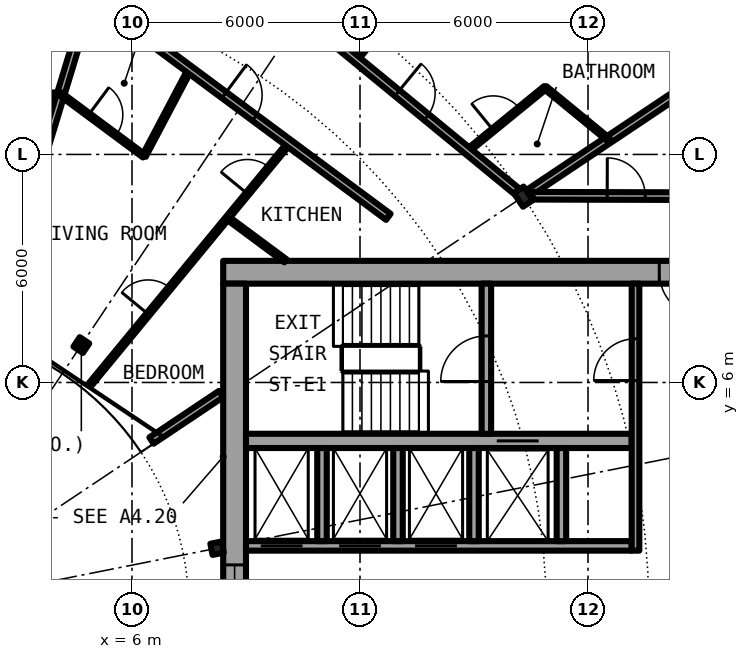
"""IFC4 building model, lengths in metres.
Left out: names, types, materials, properties, quantities, classifications, styles, units other than length and angle.
Written with IfcOpenShell. Run it as: python <this file> out.ifc"""

import sys

from ifc_helpers import new_model, si_unit, direction, frame, frame_2d, origin, origin_2d, place, context, subcontext, project, spatial, rectangle, i_section, extrude, element, fill, save


model = new_model("IFC4")
c1 = context("Model", 3, precision=1e-05, world=origin(), true_north=direction((0.0, 1.0)))
c2 = subcontext(c1, "Body", "Model", "MODEL_VIEW")
j1 = project(units=[si_unit("LENGTHUNIT", "METRE"), si_unit("PLANEANGLEUNIT", "RADIAN")], contexts=[c1])
p1 = place(None, origin())
s1 = spatial("IfcSite", under=j1, at=p1, CompositionType="ELEMENT")
p2 = place(p1, origin())
s2 = spatial("IfcBuilding", under=s1, at=p2, CompositionType="ELEMENT")
p3 = place(p2, frame((0.0, 0.0, 111.65)))
s3 = spatial("IfcBuildingStorey", under=s2, at=p3, CompositionType="ELEMENT", Elevation=111.65)
p4 = place(p3, frame((16.297, 10.889, 0.0), z_axis=(0.0, 0.0, 1.0), x_axis=(0.831469612303, 0.55557023302, 0.0)))
e1 = element("IfcColumn", 1, at=p4, inside=s3, PredefinedType="COLUMN", context=c2, shape_type="SweptSolid", body=[
    extrude(i_section(OverallWidth=0.307, OverallDepth=0.432, WebThickness=0.021, FlangeThickness=0.04, FilletRadius=0.027, at=origin_2d()), origin(), (0.0, 0.0, 1.0), 3.05),
])
for number, where, z_axis, x_axis in (
    (2, (8.239, 1.639, 0.0), (0.0, 0.0, 1.0), (0.981, 0.195, 0.0)),
    (3, (4.667, 6.984, 0.0), (0.0, 0.0, 1.0), (0.556, 0.831, 0.0)),
):
    element("IfcColumn", number, at=place(p3, frame(where, z_axis=z_axis, x_axis=x_axis)), inside=s3, PredefinedType="COLUMN", context=c2, shape_type="SweptSolid", body=[
        extrude(i_section(OverallWidth=0.3, OverallDepth=0.3, WebThickness=0.011, FlangeThickness=0.019, FilletRadius=0.027, at=origin_2d()), origin(), (0.0, 0.0, 1.0), 3.05),
    ])
p5 = place(p3, frame((22.2, 8.9, 0.0), z_axis=(0.0, 0.0, 1.0), x_axis=(-1.0, 0.0, 0.0)))
e4 = element("IfcWall", 4, at=p5, inside=s3, PredefinedType="SHEAR", context=c2, shape_type="SweptSolid", body=[
    extrude(rectangle(XDim=13.8, YDim=0.6, at=frame_2d((6.9, 0.0))), origin(), (0.0, 0.0, 1.0), 3.05),
])
p6 = place(p5, frame((1.125, 0.0, 0.0)))
e5 = element("IfcOpeningElement", 5, at=p6, cuts=e4, PredefinedType="OPENING", context=c2, shape_type="SweptSolid", body=[
    extrude(rectangle(XDim=1.2, YDim=2.3, at=frame_2d((0.6, 1.15))), frame((0.0, 0.31, 0.0), z_axis=(0.0, -1.0, 0.0), x_axis=(1.0, 0.0, 0.0)), (0.0, 0.0, 1.0), 0.62),
])
p7 = place(p3, frame((8.7, -8.6, 0.0), z_axis=(0.0, 0.0, 1.0), x_axis=(0.0, 1.0, 0.0)))
e6 = element("IfcWall", 6, at=p7, inside=s3, PredefinedType="SHEAR", context=c2, shape_type="SweptSolid", body=[
    extrude(rectangle(XDim=17.2, YDim=0.6, at=frame_2d((8.6, 0.0))), origin(), (0.0, 0.0, 1.0), 3.05),
])
p8 = place(p7, frame((7.4, 0.0, 0.1)))
e7 = element("IfcOpeningElement", 7, at=p8, cuts=e6, PredefinedType="OPENING", context=c2, shape_type="SweptSolid", body=[
    extrude(rectangle(XDim=2.4, YDim=2.2, at=frame_2d((1.2, 1.1))), frame((0.0, 0.31, 0.0), z_axis=(0.0, -1.0, 0.0), x_axis=(1.0, 0.0, 0.0)), (0.0, 0.0, 1.0), 0.62),
])
p9 = place(p3, frame((9.0, 1.7, 0.0), z_axis=(0.0, 0.0, 1.0), x_axis=(1.0, 0.0, 0.0)))
e8 = element("IfcWall", 8, at=p9, inside=s3, PredefinedType="SHEAR", context=c2, shape_type="SweptSolid", body=[
    extrude(rectangle(XDim=10.15, YDim=0.25, at=frame_2d((5.075, 0.0))), origin(), (0.0, 0.0, 1.0), 3.05),
])
p10 = place(p9, frame((0.387, 0.0, 0.0)))
e9 = element("IfcOpeningElement", 9, at=p10, cuts=e8, PredefinedType="OPENING", context=c2, shape_type="SweptSolid", body=[
    extrude(rectangle(XDim=1.1, YDim=2.3, at=frame_2d((0.55, 1.15))), frame((0.0, 0.135, 0.0), z_axis=(0.0, -1.0, 0.0), x_axis=(1.0, 0.0, 0.0)), (0.0, 0.0, 1.0), 0.27),
])
p11 = place(p9, frame((2.45, 0.0, 0.0)))
e10 = element("IfcOpeningElement", 10, at=p11, cuts=e8, PredefinedType="OPENING", context=c2, shape_type="SweptSolid", body=[
    extrude(rectangle(XDim=1.1, YDim=2.3, at=frame_2d((0.55, 1.15))), frame((0.0, 0.135, 0.0), z_axis=(0.0, -1.0, 0.0), x_axis=(1.0, 0.0, 0.0)), (0.0, 0.0, 1.0), 0.27),
])
p12 = place(p9, frame((4.45, 0.0, 0.0)))
e11 = element("IfcOpeningElement", 11, at=p12, cuts=e8, PredefinedType="OPENING", context=c2, shape_type="SweptSolid", body=[
    extrude(rectangle(XDim=1.1, YDim=2.3, at=frame_2d((0.55, 1.15))), frame((0.0, 0.135, 0.0), z_axis=(0.0, -1.0, 0.0), x_axis=(1.0, 0.0, 0.0)), (0.0, 0.0, 1.0), 0.27),
])
p13 = place(p3, frame((9.0, 4.462, 0.0), z_axis=(0.0, 0.0, 1.0), x_axis=(1.0, 0.0, 0.0)))
e12 = element("IfcWall", 12, at=p13, inside=s3, PredefinedType="SHEAR", context=c2, shape_type="SweptSolid", body=[
    extrude(rectangle(XDim=10.15, YDim=0.375, at=frame_2d((5.075, 0.0))), origin(), (0.0, 0.0, 1.0), 3.05),
])
p14 = place(p13, frame((6.6, 0.0, 0.0)))
e13 = element("IfcOpeningElement", 13, at=p14, cuts=e12, PredefinedType="OPENING", context=c2, shape_type="SweptSolid", body=[
    extrude(rectangle(XDim=1.1, YDim=2.3, at=frame_2d((0.55, 1.15))), frame((0.0, 0.198, 0.0), z_axis=(0.0, -1.0, 0.0), x_axis=(1.0, 0.0, 0.0)), (0.0, 0.0, 1.0), 0.395),
])
p15 = place(p3, frame((15.325, 4.65, 0.0), z_axis=(0.0, 0.0, 1.0), x_axis=(0.0, 1.0, 0.0)))
e14 = element("IfcWall", 14, at=p15, inside=s3, PredefinedType="SHEAR", context=c2, shape_type="SweptSolid", body=[
    extrude(rectangle(XDim=3.95, YDim=0.25, at=frame_2d((1.975, 0.0))), origin(), (0.0, 0.0, 1.0), 3.05),
])
p16 = place(p15, frame((1.375, 0.0, 0.0)))
e15 = element("IfcOpeningElement", 15, at=p16, cuts=e14, PredefinedType="OPENING", context=c2, shape_type="SweptSolid", body=[
    extrude(rectangle(XDim=1.2, YDim=2.3, at=frame_2d((0.6, 1.15))), frame((0.0, 0.135, 0.0), z_axis=(0.0, -1.0, 0.0), x_axis=(1.0, 0.0, 0.0)), (0.0, 0.0, 1.0), 0.27),
])
for number, where, z_axis, x_axis in (
    (16, (15.0, 1.825, 0.0), (0.0, 0.0, 1.0), (0.0, 1.0, 0.0)),
    (17, (17.3, 1.825, 0.0), (0.0, 0.0, 1.0), (0.0, 1.0, 0.0)),
):
    element("IfcWall", number, at=place(p3, frame(where, z_axis=z_axis, x_axis=x_axis)), inside=s3, PredefinedType="SOLIDWALL", context=c2, shape_type="SweptSolid", body=[
        extrude(rectangle(XDim=2.45, YDim=0.25, at=frame_2d((1.225, 0.0))), origin(), (0.0, 0.0, 1.0), 2.7),
    ])
p17 = place(p3, frame((19.25, 1.575, 0.0), z_axis=(0.0, 0.0, 1.0), x_axis=(0.0, 1.0, 0.0)))
e18 = element("IfcWall", 18, at=p17, inside=s3, PredefinedType="SOLIDWALL", context=c2, shape_type="SweptSolid", body=[
    extrude(rectangle(XDim=7.025, YDim=0.2, at=frame_2d((3.513, 0.0))), origin(), (0.0, 0.0, 1.0), 2.7),
])
p18 = place(p17, frame((4.475, 0.0, 0.0)))
e19 = element("IfcOpeningElement", 19, at=p18, cuts=e18, PredefinedType="OPENING", context=c2, shape_type="SweptSolid", body=[
    extrude(rectangle(XDim=1.1, YDim=2.3, at=frame_2d((0.55, 1.15))), frame((0.0, 0.11, 0.0), z_axis=(0.0, -1.0, 0.0), x_axis=(1.0, 0.0, 0.0)), (0.0, 0.0, 1.0), 0.22),
])
for number, where, z_axis, x_axis in (
    (20, (11.0, 1.825, 0.0), (0.0, 0.0, 1.0), (0.0, 1.0, 0.0)),
    (21, (13.0, 1.825, 0.0), (0.0, 0.0, 1.0), (0.0, 1.0, 0.0)),
):
    element("IfcWall", number, at=place(p3, frame(where, z_axis=z_axis, x_axis=x_axis)), inside=s3, PredefinedType="SOLIDWALL", context=c2, shape_type="SweptSolid", body=[
        extrude(rectangle(XDim=2.45, YDim=0.25, at=frame_2d((1.225, 0.0))), origin(), (0.0, 0.0, 1.0), 2.7),
    ])
p19 = place(p3, frame((2.243, 7.387, 0.0), z_axis=(0.0, 0.0, 1.0), x_axis=(0.290622919271, 0.956837665853, 0.0)))
e22 = element("IfcWall", 22, at=p19, inside=s3, PredefinedType="PARTITIONING", context=c2, shape_type="SweptSolid", body=[
    extrude(rectangle(XDim=9.18, YDim=0.2, at=frame_2d((4.59, 0.0))), origin(), (0.0, 0.0, 1.0), 2.7),
])
p20 = place(p3, frame((4.909, 5.958, 0.0), z_axis=(0.0, 0.0, 1.0), x_axis=(0.635976043025, 0.771708800454, 0.0)))
e23 = element("IfcWall", 23, at=p20, inside=s3, PredefinedType="PARTITIONING", context=c2, shape_type="SweptSolid", body=[
    extrude(rectangle(XDim=8.213, YDim=0.1, at=frame_2d((4.106, 0.0))), origin(), (0.0, 0.0, 1.0), 2.7),
])
p21 = place(p20, frame((6.49, 0.0, 0.0)))
e24 = element("IfcOpeningElement", 24, at=p21, cuts=e23, PredefinedType="OPENING", context=c2, shape_type="SweptSolid", body=[
    extrude(rectangle(XDim=0.9, YDim=2.3, at=frame_2d((0.45, 1.15))), frame((0.0, 0.06, 0.0), z_axis=(0.0, -1.0, 0.0), x_axis=(1.0, 0.0, 0.0)), (0.0, 0.0, 1.0), 0.12),
])
p22 = place(p20, frame((2.384, 0.0, 0.0)))
e25 = element("IfcOpeningElement", 25, at=p22, cuts=e23, PredefinedType="OPENING", context=c2, shape_type="SweptSolid", body=[
    extrude(rectangle(XDim=0.9, YDim=2.3, at=frame_2d((0.45, 1.15))), frame((0.0, 0.06, 0.0), z_axis=(0.0, -1.0, 0.0), x_axis=(1.0, 0.0, 0.0)), (0.0, 0.0, 1.0), 0.12),
])
p23 = place(p3, frame((6.318, 11.96, 0.0), z_axis=(0.0, 0.0, 1.0), x_axis=(0.467001992543, 0.884256263173, 0.0)))
e26 = element("IfcWall", 26, at=p23, inside=s3, PredefinedType="PARTITIONING", context=c2, shape_type="SweptSolid", body=[
    extrude(rectangle(XDim=2.572, YDim=0.1, at=frame_2d((1.286, 0.0))), origin(), (0.0, 0.0, 1.0), 2.7),
])
p24 = place(p3, frame((11.9, 14.498, 0.0), z_axis=(0.0, 0.0, 1.0), x_axis=(0.634465454582, 0.772951218993, 0.0)))
e27 = element("IfcWall", 27, at=p24, inside=s3, PredefinedType="PARTITIONING", context=c2, shape_type="SweptSolid", body=[
    extrude(rectangle(XDim=8.42, YDim=0.1, at=frame_2d((4.21, 0.0))), origin(), (0.0, 0.0, 1.0), 2.7),
])
p25 = place(p24, frame((0.84, 0.0, 0.0)))
e28 = element("IfcOpeningElement", 28, at=p25, cuts=e27, PredefinedType="OPENING", context=c2, shape_type="SweptSolid", body=[
    extrude(rectangle(XDim=0.9, YDim=2.3, at=frame_2d((0.45, 1.15))), frame((0.0, 0.06, 0.0), z_axis=(0.0, -1.0, 0.0), x_axis=(1.0, 0.0, 0.0)), (0.0, 0.0, 1.0), 0.12),
])
p26 = place(p24, frame((5.051, 0.0, 0.0)))
e29 = element("IfcOpeningElement", 29, at=p26, cuts=e27, PredefinedType="OPENING", context=c2, shape_type="SweptSolid", body=[
    extrude(rectangle(XDim=0.9, YDim=2.3, at=frame_2d((0.45, 1.15))), frame((0.0, 0.06, 0.0), z_axis=(0.0, -1.0, 0.0), x_axis=(1.0, 0.0, 0.0)), (0.0, 0.0, 1.0), 0.12),
])
p27 = place(p3, frame((14.831, 12.092, 0.0), z_axis=(0.0, 0.0, 1.0), x_axis=(0.774979608522, 0.631986239072, 0.0)))
e30 = element("IfcWall", 30, at=p27, inside=s3, PredefinedType="PARTITIONING", context=c2, shape_type="SweptSolid", body=[
    extrude(rectangle(XDim=2.636, YDim=0.1, at=frame_2d((1.318, 0.0))), origin(), (0.0, 0.0, 1.0), 2.7),
])
p28 = place(p27, frame((0.868, 0.0, 0.0)))
e31 = element("IfcOpeningElement", 31, at=p28, cuts=e30, PredefinedType="OPENING", context=c2, shape_type="SweptSolid", body=[
    extrude(rectangle(XDim=0.9, YDim=2.3, at=frame_2d((0.45, 1.15))), frame((0.0, 0.06, 0.0), z_axis=(0.0, -1.0, 0.0), x_axis=(1.0, 0.0, 0.0)), (0.0, 0.0, 1.0), 0.12),
])
p29 = place(p3, frame((16.477, 11.009, 0.0), z_axis=(0.0, 0.0, 1.0), x_axis=(0.831406593008, 0.555664536482, 0.0)))
e32 = element("IfcWall", 32, at=p29, inside=s3, PredefinedType="PARTITIONING", context=c2, shape_type="SweptSolid", body=[
    extrude(rectangle(XDim=7.358, YDim=0.2, at=frame_2d((3.679, 0.0))), origin(), (0.0, 0.0, 1.0), 2.7),
])
p30 = place(p3, frame((6.513, 4.472, 0.0), z_axis=(0.0, 0.0, 1.0), x_axis=(0.831333375071, 0.555774072347, 0.0)))
e33 = element("IfcWall", 33, at=p30, inside=s3, PredefinedType="PARTITIONING", context=c2, shape_type="SweptSolid", body=[
    extrude(rectangle(XDim=2.203, YDim=0.2, at=frame_2d((1.101, 0.0))), origin(), (0.0, 0.0, 1.0), 2.7),
])
p31 = place(p3, frame((16.54, 10.913, 0.0), z_axis=(0.0, 0.0, 1.0), x_axis=(0.99999670426, -0.002567385634, 0.0)))
e34 = element("IfcWall", 34, at=p31, inside=s3, PredefinedType="PARTITIONING", context=c2, shape_type="SweptSolid", body=[
    extrude(rectangle(XDim=5.135, YDim=0.2, at=frame_2d((2.567, 0.0))), origin(), (0.0, 0.0, 1.0), 2.7),
])
p32 = place(p31, frame((1.965, 0.0, 0.0)))
e35 = element("IfcOpeningElement", 35, at=p32, cuts=e34, PredefinedType="OPENING", context=c2, shape_type="SweptSolid", body=[
    extrude(rectangle(XDim=1.0, YDim=2.3, at=frame_2d((0.5, 1.15))), frame((0.0, 0.11, 0.0), z_axis=(0.0, -1.0, 0.0), x_axis=(1.0, 0.0, 0.0)), (0.0, 0.0, 1.0), 0.22),
])
p33 = place(p3, frame((1.392, 13.454, 0.0), z_axis=(0.0, 0.0, 1.0), x_axis=(0.998779365748, 0.049394114582, 0.0)))
e36 = element("IfcWall", 36, at=p33, inside=s3, PredefinedType="PARTITIONING", context=c2, shape_type="SweptSolid", body=[
    extrude(rectangle(XDim=2.733, YDim=0.1, at=frame_2d((1.367, 0.0))), origin(), (0.0, 0.0, 1.0), 2.7),
])
p34 = place(p33, frame((0.917, 0.0, 0.0)))
e37 = element("IfcOpeningElement", 37, at=p34, cuts=e36, PredefinedType="OPENING", context=c2, shape_type="SweptSolid", body=[
    extrude(rectangle(XDim=0.9, YDim=2.3, at=frame_2d((0.45, 1.15))), frame((0.0, 0.06, 0.0), z_axis=(0.0, -1.0, 0.0), x_axis=(1.0, 0.0, 0.0)), (0.0, 0.0, 1.0), 0.12),
])
p35 = place(p3, frame((4.122, 13.589, 0.0), z_axis=(0.0, 0.0, 1.0), x_axis=(0.803128348509, -0.595806055542, 0.0)))
e38 = element("IfcWall", 38, at=p35, inside=s3, PredefinedType="PARTITIONING", context=c2, shape_type="SweptSolid", body=[
    extrude(rectangle(XDim=2.734, YDim=0.1, at=frame_2d((1.367, 0.0))), origin(), (0.0, 0.0, 1.0), 2.7),
])
p36 = place(p35, frame((0.917, 0.0, 0.0)))
e39 = element("IfcOpeningElement", 39, at=p36, cuts=e38, PredefinedType="OPENING", context=c2, shape_type="SweptSolid", body=[
    extrude(rectangle(XDim=0.9, YDim=2.3, at=frame_2d((0.45, 1.15))), frame((0.0, 0.06, 0.0), z_axis=(0.0, -1.0, 0.0), x_axis=(1.0, 0.0, 0.0)), (0.0, 0.0, 1.0), 0.12),
])
p37 = place(p3, frame((8.513, 10.332, 0.0), z_axis=(0.0, 0.0, 1.0), x_axis=(0.803149591038, -0.595777420196, 0.0)))
e40 = element("IfcWall", 40, at=p37, inside=s3, PredefinedType="PARTITIONING", context=c2, shape_type="SweptSolid", body=[
    extrude(rectangle(XDim=1.9, YDim=0.1, at=frame_2d((0.95, 0.0))), origin(), (0.0, 0.0, 1.0), 2.7),
])
p38 = place(p3, frame((4.906, 16.172, 0.0), z_axis=(0.0, 0.0, 1.0), x_axis=(0.803191461888, -0.595720971219, 0.0)))
e41 = element("IfcWall", 41, at=p38, inside=s3, PredefinedType="PARTITIONING", context=c2, shape_type="SweptSolid", body=[
    extrude(rectangle(XDim=9.76, YDim=0.2, at=frame_2d((4.88, 0.0))), origin(), (0.0, 0.0, 1.0), 2.7),
])
p39 = place(p38, frame((4.38, 0.0, 0.0)))
e42 = element("IfcOpeningElement", 42, at=p39, cuts=e41, PredefinedType="OPENING", context=c2, shape_type="SweptSolid", body=[
    extrude(rectangle(XDim=1.0, YDim=2.3, at=frame_2d((0.5, 1.15))), frame((0.0, 0.11, 0.0), z_axis=(0.0, -1.0, 0.0), x_axis=(1.0, 0.0, 0.0)), (0.0, 0.0, 1.0), 0.22),
])
p40 = place(p3, frame((7.5, 18.108, 0.0), z_axis=(0.0, 0.0, 1.0), x_axis=(0.773049018445, -0.634346289562, 0.0)))
e43 = element("IfcWall", 43, at=p40, inside=s3, PredefinedType="PARTITIONING", context=c2, shape_type="SweptSolid", body=[
    extrude(rectangle(XDim=11.219, YDim=0.2, at=frame_2d((5.61, 0.0))), origin(), (0.0, 0.0, 1.0), 2.39),
])
p41 = place(p40, frame((7.085, 0.0, 0.0)))
e44 = element("IfcOpeningElement", 44, at=p41, cuts=e43, PredefinedType="OPENING", context=c2, shape_type="SweptSolid", body=[
    extrude(rectangle(XDim=1.0, YDim=2.3, at=frame_2d((0.5, 1.15))), frame((0.0, 0.11, 0.0), z_axis=(0.0, -1.0, 0.0), x_axis=(1.0, 0.0, 0.0)), (0.0, 0.0, 1.0), 0.22),
])
p42 = place(p3, frame((16.874, 13.758, 0.0), z_axis=(0.0, 0.0, 1.0), x_axis=(0.772948171844, -0.634469166818, 0.0)))
e45 = element("IfcWall", 45, at=p42, inside=s3, PredefinedType="PARTITIONING", context=c2, shape_type="SweptSolid", body=[
    extrude(rectangle(XDim=2.158, YDim=0.1, at=frame_2d((1.079, 0.0))), origin(), (0.0, 0.0, 1.0), 2.7),
])
p43 = place(p10, origin())
e46 = element("IfcDoor", 46, at=p43, inside=s3, OperationType="DOUBLE_DOOR_SLIDING", PredefinedType="DOOR", context=c2, shape_type="SweptSolid", body=[
    extrude(rectangle(XDim=1.1, YDim=2.3, at=frame_2d((0.55, 1.15))), frame((0.0, 0.025, 0.0), z_axis=(0.0, -1.0, 0.0), x_axis=(1.0, 0.0, 0.0)), (0.0, 0.0, 1.0), 0.05),
])
fill(e9, e46)
p44 = place(p11, origin())
e47 = element("IfcDoor", 47, at=p44, inside=s3, OperationType="DOUBLE_DOOR_SLIDING", PredefinedType="DOOR", context=c2, shape_type="SweptSolid", body=[
    extrude(rectangle(XDim=1.1, YDim=2.3, at=frame_2d((0.55, 1.15))), frame((0.0, 0.025, 0.0), z_axis=(0.0, -1.0, 0.0), x_axis=(1.0, 0.0, 0.0)), (0.0, 0.0, 1.0), 0.05),
])
fill(e10, e47)
p45 = place(p12, origin())
e48 = element("IfcDoor", 48, at=p45, inside=s3, OperationType="DOUBLE_DOOR_SLIDING", PredefinedType="DOOR", context=c2, shape_type="SweptSolid", body=[
    extrude(rectangle(XDim=1.1, YDim=2.3, at=frame_2d((0.55, 1.15))), frame((0.0, 0.025, 0.0), z_axis=(0.0, -1.0, 0.0), x_axis=(1.0, 0.0, 0.0)), (0.0, 0.0, 1.0), 0.05),
])
fill(e11, e48)
p46 = place(p14, origin())
e49 = element("IfcDoor", 49, at=p46, inside=s3, OperationType="DOUBLE_DOOR_SLIDING", PredefinedType="DOOR", context=c2, shape_type="SweptSolid", body=[
    extrude(rectangle(XDim=1.1, YDim=2.3, at=frame_2d((0.55, 1.15))), frame((0.0, 0.025, 0.0), z_axis=(0.0, -1.0, 0.0), x_axis=(1.0, 0.0, 0.0)), (0.0, 0.0, 1.0), 0.05),
])
fill(e13, e49)
p47 = place(p16, origin())
e50 = element("IfcDoor", 50, at=p47, inside=s3, OperationType="SINGLE_SWING_LEFT", PredefinedType="DOOR", context=c2, shape_type="SweptSolid", body=[
    extrude(rectangle(XDim=1.2, YDim=2.3, at=frame_2d((0.6, 1.15))), frame((0.0, 0.025, 0.0), z_axis=(0.0, -1.0, 0.0), x_axis=(1.0, 0.0, 0.0)), (0.0, 0.0, 1.0), 0.05),
])
fill(e15, e50)
p48 = place(p18, origin())
e51 = element("IfcDoor", 51, at=p48, inside=s3, OperationType="SINGLE_SWING_LEFT", PredefinedType="DOOR", context=c2, shape_type="SweptSolid", body=[
    extrude(rectangle(XDim=1.1, YDim=2.3, at=frame_2d((0.55, 1.15))), frame((0.0, 0.025, 0.0), z_axis=(0.0, -1.0, 0.0), x_axis=(1.0, 0.0, 0.0)), (0.0, 0.0, 1.0), 0.05),
])
fill(e19, e51)
p49 = place(p6, origin())
e52 = element("IfcDoor", 52, at=p49, inside=s3, OperationType="SINGLE_SWING_RIGHT", PredefinedType="DOOR", context=c2, shape_type="SweptSolid", body=[
    extrude(rectangle(XDim=1.2, YDim=2.3, at=frame_2d((0.6, 1.15))), frame((0.0, 0.025, 0.0), z_axis=(0.0, -1.0, 0.0), x_axis=(1.0, 0.0, 0.0)), (0.0, 0.0, 1.0), 0.05),
])
fill(e5, e52)
p50 = place(p8, origin())
e53 = element("IfcWindow", 53, at=p50, inside=s3, PartitioningType="SINGLE_PANEL", PredefinedType="WINDOW", context=c2, shape_type="SweptSolid", body=[
    extrude(rectangle(XDim=2.4, YDim=2.2, at=frame_2d((1.2, 1.1))), frame((0.0, 0.03, 0.0), z_axis=(0.0, -1.0, 0.0), x_axis=(1.0, 0.0, 0.0)), (0.0, 0.0, 1.0), 0.06),
])
fill(e7, e53)
p51 = place(p41, origin())
e54 = element("IfcDoor", 54, at=p51, inside=s3, OperationType="SINGLE_SWING_RIGHT", PredefinedType="DOOR", context=c2, shape_type="SweptSolid", body=[
    extrude(rectangle(XDim=1.0, YDim=2.3, at=frame_2d((0.5, 1.15))), frame((0.0, 0.025, 0.0), z_axis=(0.0, -1.0, 0.0), x_axis=(1.0, 0.0, 0.0)), (0.0, 0.0, 1.0), 0.05),
])
fill(e44, e54)
p52 = place(p28, origin())
e55 = element("IfcDoor", 55, at=p52, inside=s3, OperationType="SINGLE_SWING_RIGHT", PredefinedType="DOOR", context=c2, shape_type="SweptSolid", body=[
    extrude(rectangle(XDim=0.9, YDim=2.3, at=frame_2d((0.45, 1.15))), frame((0.0, 0.025, 0.0), z_axis=(0.0, -1.0, 0.0), x_axis=(1.0, 0.0, 0.0)), (0.0, 0.0, 1.0), 0.05),
])
fill(e31, e55)
p53 = place(p39, origin())
e56 = element("IfcDoor", 56, at=p53, inside=s3, OperationType="SINGLE_SWING_LEFT", PredefinedType="DOOR", context=c2, shape_type="SweptSolid", body=[
    extrude(rectangle(XDim=1.0, YDim=2.3, at=frame_2d((0.5, 1.15))), frame((0.0, 0.025, 0.0), z_axis=(0.0, -1.0, 0.0), x_axis=(1.0, 0.0, 0.0)), (0.0, 0.0, 1.0), 0.05),
])
fill(e42, e56)
p54 = place(p36, origin())
e57 = element("IfcDoor", 57, at=p54, inside=s3, OperationType="SINGLE_SWING_LEFT", PredefinedType="DOOR", context=c2, shape_type="SweptSolid", body=[
    extrude(rectangle(XDim=0.9, YDim=2.3, at=frame_2d((0.45, 1.15))), frame((0.0, 0.025, 0.0), z_axis=(0.0, -1.0, 0.0), x_axis=(1.0, 0.0, 0.0)), (0.0, 0.0, 1.0), 0.05),
])
fill(e39, e57)
p55 = place(p21, origin())
e58 = element("IfcDoor", 58, at=p55, inside=s3, OperationType="SINGLE_SWING_RIGHT", PredefinedType="DOOR", context=c2, shape_type="SweptSolid", body=[
    extrude(rectangle(XDim=0.9, YDim=2.3, at=frame_2d((0.45, 1.15))), frame((0.0, 0.025, 0.0), z_axis=(0.0, -1.0, 0.0), x_axis=(1.0, 0.0, 0.0)), (0.0, 0.0, 1.0), 0.05),
])
fill(e24, e58)
p56 = place(p22, origin())
e59 = element("IfcDoor", 59, at=p56, inside=s3, OperationType="SINGLE_SWING_LEFT", PredefinedType="DOOR", context=c2, shape_type="SweptSolid", body=[
    extrude(rectangle(XDim=0.9, YDim=2.3, at=frame_2d((0.45, 1.15))), frame((0.0, 0.025, 0.0), z_axis=(0.0, -1.0, 0.0), x_axis=(1.0, 0.0, 0.0)), (0.0, 0.0, 1.0), 0.05),
])
fill(e25, e59)
p57 = place(p32, origin())
e60 = element("IfcDoor", 60, at=p57, inside=s3, OperationType="SINGLE_SWING_LEFT", PredefinedType="DOOR", context=c2, shape_type="SweptSolid", body=[
    extrude(rectangle(XDim=1.0, YDim=2.3, at=frame_2d((0.5, 1.15))), frame((0.0, 0.025, 0.0), z_axis=(0.0, -1.0, 0.0), x_axis=(1.0, 0.0, 0.0)), (0.0, 0.0, 1.0), 0.05),
])
fill(e35, e60)
save(model, sys.argv[1])
